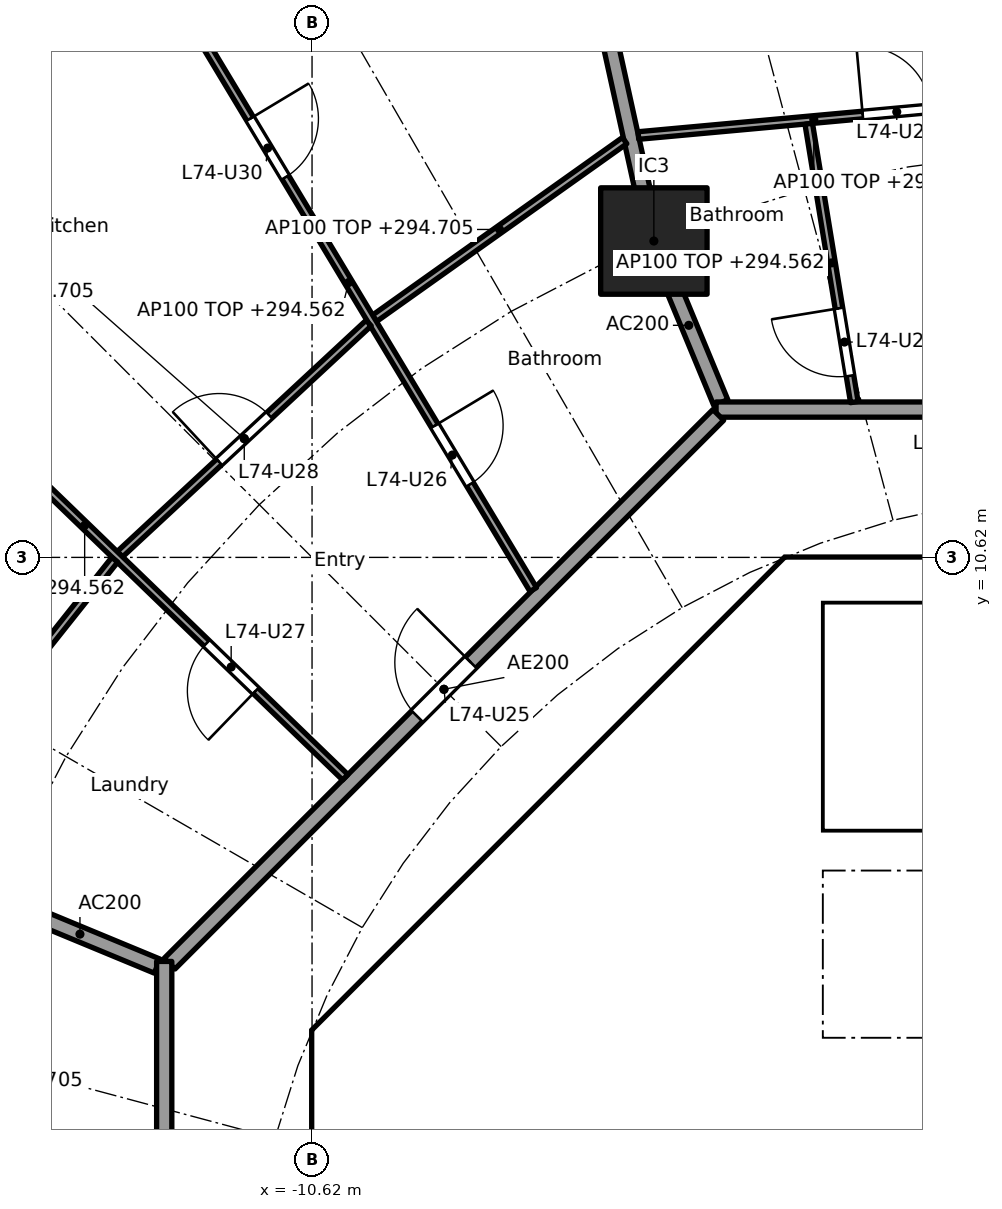
"""IFC4 building model, lengths in metres.
Left out: names, types, materials, properties, quantities, classifications, styles, units other than length and angle.
Written with IfcOpenShell. Run it as: python <this file> out.ifc"""

import sys

from ifc_helpers import new_model, si_unit, direction, frame, frame_2d, origin, origin_2d, place, context, subcontext, project, spatial, polyline, rectangle, outline, extrude, element, fill, save


model = new_model("IFC4")
c1 = context("Model", 3, precision=1e-05, world=origin(), true_north=direction((0.0, 1.0)))
c2 = subcontext(c1, "Body", "Model", "MODEL_VIEW")
j1 = project(units=[si_unit("LENGTHUNIT", "METRE"), si_unit("PLANEANGLEUNIT", "RADIAN")], contexts=[c1])
p1 = place(None, origin())
s1 = spatial("IfcSite", under=j1, at=p1, CompositionType="ELEMENT")
p2 = place(p1, origin())
s2 = spatial("IfcBuilding", under=s1, at=p2, CompositionType="ELEMENT")
p3 = place(p2, frame((0.0, 0.0, 291.8)))
s3 = spatial("IfcBuildingStorey", under=s2, at=p3, CompositionType="ELEMENT", Elevation=291.8)
p4 = place(p3, frame((-6.123, 14.782, 0.0), z_axis=(0.0, 0.0, 1.0), x_axis=(1.0, 0.0, 0.0)))
e1 = element("IfcColumn", 1, at=p4, inside=s3, PredefinedType="COLUMN", context=c2, shape_type="SweptSolid", body=[
    extrude(rectangle(XDim=1.4, YDim=1.4, at=origin_2d()), origin(), (0.0, 0.0, 1.0), 3.7),
])
p5 = place(p3, frame((-4.613, 9.988, 0.0), z_axis=(0.0, 0.0, 1.0), x_axis=(-0.707106781187, -0.707106781187, 0.0)))
e2 = element("IfcWall", 2, at=p5, inside=s3, PredefinedType="SHEAR", context=c2, shape_type="SweptSolid", body=[
    extrude(rectangle(XDim=7.602, YDim=0.6, at=frame_2d((3.801, 0.0))), origin(), (0.0, 0.0, 1.0), 3.44),
])
p6 = place(p5, frame((0.351, 0.0, 0.0)))
e3 = element("IfcOpeningElement", 3, at=p6, cuts=e2, PredefinedType="OPENING", context=c2, shape_type="SweptSolid", body=[
    extrude(rectangle(XDim=1.1, YDim=2.1, at=frame_2d((0.55, 1.05))), frame((0.0, 0.31, 0.0), z_axis=(0.0, -1.0, 0.0), x_axis=(1.0, 0.0, 0.0)), (0.0, 0.0, 1.0), 0.62),
])
p7 = place(p3, frame((-10.325, 3.801, 0.0), z_axis=(0.0, 0.0, 1.0), x_axis=(0.0, -1.0, 0.0)))
e4 = element("IfcWall", 4, at=p7, inside=s3, PredefinedType="SHEAR", context=c2, shape_type="SweptSolid", body=[
    extrude(rectangle(XDim=7.602, YDim=0.6, at=frame_2d((3.801, 0.0))), origin(), (0.0, 0.0, 1.0), 3.44),
])
p8 = place(p7, frame((0.651, 0.0, 0.0)))
e5 = element("IfcOpeningElement", 5, at=p8, cuts=e4, PredefinedType="OPENING", context=c2, shape_type="SweptSolid", body=[
    extrude(rectangle(XDim=1.5, YDim=2.1, at=frame_2d((0.75, 1.05))), frame((0.0, 0.31, 0.0), z_axis=(0.0, -1.0, 0.0), x_axis=(1.0, 0.0, 0.0)), (0.0, 0.0, 1.0), 0.62),
])
p9 = place(p7, frame((5.451, 0.0, 0.0)))
e6 = element("IfcOpeningElement", 6, at=p9, cuts=e4, PredefinedType="OPENING", context=c2, shape_type="SweptSolid", body=[
    extrude(rectangle(XDim=1.5, YDim=2.1, at=frame_2d((0.75, 1.05))), frame((0.0, 0.31, 0.0), z_axis=(0.0, -1.0, 0.0), x_axis=(1.0, 0.0, 0.0)), (0.0, 0.0, 1.0), 0.62),
])
p10 = place(p3, frame((-5.8, 4.3, 0.0), z_axis=(0.0, 0.0, 1.0), x_axis=(0.0, 1.0, 0.0)))
e7 = element("IfcWall", 7, at=p10, inside=s3, PredefinedType="PARTITIONING", context=c2, shape_type="SweptSolid", body=[
    extrude(rectangle(XDim=3.927, YDim=0.15, at=frame_2d((1.963, 0.0))), origin(), (0.0, 0.0, 1.0), 3.44),
])
p11 = place(p10, frame((1.551, 0.0, 0.0)))
e8 = element("IfcOpeningElement", 8, at=p11, cuts=e7, PredefinedType="OPENING", context=c2, shape_type="SweptSolid", body=[
    extrude(rectangle(XDim=0.9, YDim=2.1, at=frame_2d((0.45, 1.05))), frame((0.0, 0.085, 0.0), z_axis=(0.0, -1.0, 0.0), x_axis=(1.0, 0.0, 0.0)), (0.0, 0.0, 1.0), 0.17),
])
p12 = place(p3, frame((-4.0, 4.3, 0.0), z_axis=(0.0, 0.0, 1.0), x_axis=(0.0, 1.0, 0.0)))
e9 = element("IfcWall", 9, at=p12, inside=s3, PredefinedType="SOLIDWALL", context=c2, shape_type="SweptSolid", body=[
    extrude(rectangle(XDim=2.2, YDim=0.2, at=frame_2d((1.1, 0.0))), origin(), (0.0, 0.0, 1.0), 3.44),
])
p13 = place(p12, frame((0.55, 0.0, 0.0)))
e10 = element("IfcOpeningElement", 10, at=p13, cuts=e9, PredefinedType="OPENING", context=c2, shape_type="SweptSolid", body=[
    extrude(rectangle(XDim=1.1, YDim=2.1, at=frame_2d((0.55, 1.05))), frame((0.0, 0.11, 0.0), z_axis=(0.0, -1.0, 0.0), x_axis=(1.0, 0.0, 0.0)), (0.0, 0.0, 1.0), 0.22),
])
p14 = place(p3, origin())
e11 = element("IfcWall", 11, at=p14, inside=s3, PredefinedType="SHEAR", context=c2, shape_type="SweptSolid", body=[
    extrude(outline(polyline([(-10.2, 4.825), (-9.776, 4.401), (-10.025, 4.152), (-10.025, 3.801), (-10.625, 3.801), (-10.625, 4.401), (-10.2, 4.825)])), origin(), (0.0, 0.0, 1.0), 3.44),
])
p15 = place(p3, origin())
e12 = element("IfcWall", 12, at=p15, inside=s3, PredefinedType="SHEAR", context=c2, shape_type="SweptSolid", body=[
    extrude(outline(polyline([(-4.152, 10.025), (-4.401, 9.776), (-4.825, 10.2), (-4.401, 10.625), (4.401, 10.625), (4.825, 10.2), (4.401, 9.776), (4.152, 10.025), (-4.152, 10.025)])), origin(), (0.0, 0.0, 1.0), 3.44),
])
p16 = place(p3, origin())
e13 = element("IfcWall", 13, at=p16, inside=s3, PredefinedType="SOLIDWALL", context=c2, shape_type="SweptSolid", body=[
    extrude(outline(polyline([(-6.7, 4.3), (6.7, 4.3), (6.7, 2.1), (6.5, 2.1), (6.5, 4.1), (4.5, 4.1), (4.5, 2.1), (4.3, 2.1), (4.3, 4.1), (0.1, 4.1), (0.1, 2.1), (-0.1, 2.1), (-0.1, 4.1), (-6.5, 4.1), (-6.5, 2.1), (-6.7, 2.1), (-6.7, 4.3)])), origin(), (0.0, 0.0, 1.0), 3.44),
])
p17 = place(p3, frame((-10.025, 4.0, 0.0), z_axis=(0.0, 0.0, 1.0), x_axis=(1.0, 0.0, 0.0)))
e14 = element("IfcWall", 14, at=p17, inside=s3, PredefinedType="PARTITIONING", context=c2, shape_type="SweptSolid", body=[
    extrude(rectangle(XDim=3.325, YDim=0.2, at=frame_2d((1.662, 0.0))), origin(), (0.0, 0.0, 1.0), 3.44),
])
p18 = place(p3, origin())
e15 = element("IfcWall", 15, at=p18, inside=s3, PredefinedType="SOLIDWALL", context=c2, shape_type="SweptSolid", body=[
    extrude(outline(polyline([(-3.9, 7.025), (-4.1, 7.025), (-4.1, 10.025), (-3.9, 10.025), (-3.9, 7.025)])), origin(), (0.0, 0.0, 1.0), 3.44),
])
p19 = place(p3, origin())
e16 = element("IfcWall", 16, at=p19, inside=s3, PredefinedType="SOLIDWALL", context=c2, shape_type="SweptSolid", body=[
    extrude(outline(polyline([(4.1, 6.5), (-4.1, 6.5), (-4.1, 7.025), (4.1, 7.025), (4.1, 6.5)])), origin(), (0.0, 0.0, 1.0), 3.44),
])
p20 = place(p3, frame((-5.243, 12.657, 0.0), z_axis=(0.0, 0.0, 1.0), x_axis=(-0.38273085373, 0.923859888513, 0.0)))
e17 = element("IfcWall", 17, at=p20, inside=s3, PredefinedType="PARTITIONING", context=c2, shape_type="SweptSolid", body=[
    extrude(rectangle(XDim=2.199, YDim=0.2, at=frame_2d((1.1, 0.0))), origin(), (0.0, 0.0, 1.0), 3.44),
])
p21 = place(p3, frame((-6.134, 14.831, 0.0), z_axis=(0.0, 0.0, 1.0), x_axis=(-0.214842475666, 0.976648714047, 0.0)))
e18 = element("IfcWall", 18, at=p21, inside=s3, PredefinedType="PARTITIONING", context=c2, shape_type="SweptSolid", body=[
    extrude(rectangle(XDim=6.031, YDim=0.2, at=frame_2d((3.015, 0.0))), origin(), (0.0, 0.0, 1.0), 2.905),
])
p22 = place(p3, frame((-12.657, 5.243, 0.0), z_axis=(0.0, 0.0, 1.0), x_axis=(-0.923869415315, 0.382707856524, 0.0)))
e19 = element("IfcWall", 19, at=p22, inside=s3, PredefinedType="PARTITIONING", context=c2, shape_type="SweptSolid", body=[
    extrude(rectangle(XDim=2.2, YDim=0.2, at=frame_2d((1.1, 0.0))), origin(), (0.0, 0.0, 1.0), 3.44),
])
p23 = place(p3, frame((5.104, 12.565, 0.0), z_axis=(0.0, 0.0, 1.0), x_axis=(-1.0, 0.0, 0.0)))
e20 = element("IfcWall", 20, at=p23, inside=s3, PredefinedType="PARTITIONING", context=c2, shape_type="SweptSolid", body=[
    extrude(rectangle(XDim=10.409, YDim=0.2, at=frame_2d((5.205, 0.0))), origin(), (0.0, 0.0, 1.0), 3.44),
])
p24 = place(p23, frame((6.339, 0.0, 0.0)))
e21 = element("IfcOpeningElement", 21, at=p24, cuts=e20, PredefinedType="OPENING", context=c2, shape_type="SweptSolid", body=[
    extrude(rectangle(XDim=1.0, YDim=2.1, at=frame_2d((0.5, 1.05))), frame((0.0, 0.11, 0.0), z_axis=(0.0, -1.0, 0.0), x_axis=(1.0, 0.0, 0.0)), (0.0, 0.0, 1.0), 0.22),
])
p25 = place(p3, frame((-5.275, 12.494, 0.0), z_axis=(0.0, 0.0, 1.0), x_axis=(-0.707106781187, -0.707106781187, 0.0)))
e22 = element("IfcWall", 22, at=p25, inside=s3, PredefinedType="PARTITIONING", context=c2, shape_type="SweptSolid", body=[
    extrude(rectangle(XDim=10.209, YDim=0.2, at=frame_2d((5.104, 0.0))), origin(), (0.0, 0.0, 1.0), 3.44),
])
p26 = place(p25, frame((4.604, 0.0, 0.0)))
e23 = element("IfcOpeningElement", 23, at=p26, cuts=e22, PredefinedType="OPENING", context=c2, shape_type="SweptSolid", body=[
    extrude(rectangle(XDim=1.0, YDim=2.1, at=frame_2d((0.5, 1.05))), frame((0.0, 0.11, 0.0), z_axis=(0.0, -1.0, 0.0), x_axis=(1.0, 0.0, 0.0)), (0.0, 0.0, 1.0), 0.22),
])
p27 = place(p3, frame((-12.565, 5.304, 0.0), z_axis=(0.0, 0.0, 1.0), x_axis=(0.0, -1.0, 0.0)))
e24 = element("IfcWall", 24, at=p27, inside=s3, PredefinedType="PARTITIONING", context=c2, shape_type="SweptSolid", body=[
    extrude(rectangle(XDim=10.409, YDim=0.2, at=frame_2d((5.205, 0.0))), origin(), (0.0, 0.0, 1.0), 3.44),
])
p28 = place(p27, frame((4.804, 0.0, 0.0)))
e25 = element("IfcOpeningElement", 25, at=p28, cuts=e24, PredefinedType="OPENING", context=c2, shape_type="SweptSolid", body=[
    extrude(rectangle(XDim=1.0, YDim=2.1, at=frame_2d((0.5, 1.05))), frame((0.0, 0.11, 0.0), z_axis=(0.0, -1.0, 0.0), x_axis=(1.0, 0.0, 0.0)), (0.0, 0.0, 1.0), 0.22),
])
p29 = place(p3, frame((-1.711, 16.592, 0.0), z_axis=(0.0, 0.0, 1.0), x_axis=(-0.995843837247, -0.091077175065, 0.0)))
e26 = element("IfcWall", 26, at=p29, inside=s3, PredefinedType="PARTITIONING", context=c2, shape_type="SweptSolid", body=[
    extrude(rectangle(XDim=4.635, YDim=0.1, at=frame_2d((2.317, 0.0))), origin(), (0.0, 0.0, 1.0), 2.905),
])
p30 = place(p29, frame((0.771, 0.0, 0.0)))
e27 = element("IfcOpeningElement", 27, at=p30, cuts=e26, PredefinedType="OPENING", context=c2, shape_type="SweptSolid", body=[
    extrude(rectangle(XDim=0.9, YDim=2.1, at=frame_2d((0.45, 1.05))), frame((0.0, 0.06, 0.0), z_axis=(0.0, -1.0, 0.0), x_axis=(1.0, 0.0, 0.0)), (0.0, 0.0, 1.0), 0.12),
])
p31 = place(p3, frame((-3.486, 12.663, 0.0), z_axis=(0.0, 0.0, 1.0), x_axis=(-0.161602751674, 0.986855891532, 0.0)))
e28 = element("IfcWall", 28, at=p31, inside=s3, PredefinedType="PARTITIONING", context=c2, shape_type="SweptSolid", body=[
    extrude(rectangle(XDim=3.71, YDim=0.1, at=frame_2d((1.855, 0.0))), origin(), (0.0, 0.0, 1.0), 2.762),
])
p32 = place(p31, frame((0.35, 0.0, 0.0)))
e29 = element("IfcOpeningElement", 29, at=p32, cuts=e28, PredefinedType="OPENING", context=c2, shape_type="SweptSolid", body=[
    extrude(rectangle(XDim=0.9, YDim=2.1, at=frame_2d((0.45, 1.05))), frame((0.0, 0.06, 0.0), z_axis=(0.0, -1.0, 0.0), x_axis=(1.0, 0.0, 0.0)), (0.0, 0.0, 1.0), 0.12),
])
p33 = place(p3, frame((-6.508, 16.103, 0.0), z_axis=(0.0, 0.0, 1.0), x_axis=(-0.815202203556, -0.579176456114, 0.0)))
e30 = element("IfcWall", 30, at=p33, inside=s3, PredefinedType="PARTITIONING", context=c2, shape_type="SweptSolid", body=[
    extrude(rectangle(XDim=4.036, YDim=0.1, at=frame_2d((2.018, 0.0))), origin(), (0.0, 0.0, 1.0), 2.905),
])
p34 = place(p3, frame((-7.709, 10.197, 0.0), z_axis=(0.0, 0.0, 1.0), x_axis=(-0.515516160663, 0.856879856278, 0.0)))
e31 = element("IfcWall", 31, at=p34, inside=s3, PredefinedType="PARTITIONING", context=c2, shape_type="SweptSolid", body=[
    extrude(rectangle(XDim=9.426, YDim=0.1, at=frame_2d((4.713, 0.0))), origin(), (0.0, 0.0, 1.0), 2.762),
])
p35 = place(p34, frame((1.615, 0.0, 0.0)))
e32 = element("IfcOpeningElement", 32, at=p35, cuts=e31, PredefinedType="OPENING", context=c2, shape_type="SweptSolid", body=[
    extrude(rectangle(XDim=0.9, YDim=2.1, at=frame_2d((0.45, 1.05))), frame((0.0, 0.06, 0.0), z_axis=(0.0, -1.0, 0.0), x_axis=(1.0, 0.0, 0.0)), (0.0, 0.0, 1.0), 0.12),
])
p36 = place(p34, frame((6.328, 0.0, 0.0)))
e33 = element("IfcOpeningElement", 33, at=p36, cuts=e31, PredefinedType="OPENING", context=c2, shape_type="SweptSolid", body=[
    extrude(rectangle(XDim=0.9, YDim=2.1, at=frame_2d((0.45, 1.05))), frame((0.0, 0.06, 0.0), z_axis=(0.0, -1.0, 0.0), x_axis=(1.0, 0.0, 0.0)), (0.0, 0.0, 1.0), 0.12),
])
p37 = place(p3, frame((-9.875, 13.702, 0.0), z_axis=(0.0, 0.0, 1.0), x_axis=(-0.732618266441, -0.680639754699, 0.0)))
e34 = element("IfcWall", 34, at=p37, inside=s3, PredefinedType="PARTITIONING", context=c2, shape_type="SweptSolid", body=[
    extrude(rectangle(XDim=4.467, YDim=0.1, at=frame_2d((2.233, 0.0))), origin(), (0.0, 0.0, 1.0), 2.905),
])
p38 = place(p37, frame((1.783, 0.0, 0.0)))
e35 = element("IfcOpeningElement", 35, at=p38, cuts=e34, PredefinedType="OPENING", context=c2, shape_type="SweptSolid", body=[
    extrude(rectangle(XDim=0.9, YDim=2.1, at=frame_2d((0.45, 1.05))), frame((0.0, 0.06, 0.0), z_axis=(0.0, -1.0, 0.0), x_axis=(1.0, 0.0, 0.0)), (0.0, 0.0, 1.0), 0.12),
])
p39 = place(p3, frame((-10.183, 7.727, 0.0), z_axis=(0.0, 0.0, 1.0), x_axis=(-0.719063433856, 0.694944442449, 0.0)))
e36 = element("IfcWall", 36, at=p39, inside=s3, PredefinedType="PARTITIONING", context=c2, shape_type="SweptSolid", body=[
    extrude(rectangle(XDim=9.535, YDim=0.1, at=frame_2d((4.768, 0.0))), origin(), (0.0, 0.0, 1.0), 2.762),
])
p40 = place(p39, frame((1.637, 0.0, 0.0)))
e37 = element("IfcOpeningElement", 37, at=p40, cuts=e36, PredefinedType="OPENING", context=c2, shape_type="SweptSolid", body=[
    extrude(rectangle(XDim=0.9, YDim=2.1, at=frame_2d((0.45, 1.05))), frame((0.0, 0.06, 0.0), z_axis=(0.0, -1.0, 0.0), x_axis=(1.0, 0.0, 0.0)), (0.0, 0.0, 1.0), 0.12),
])
p41 = place(p39, frame((6.405, 0.0, 0.0)))
e38 = element("IfcOpeningElement", 38, at=p41, cuts=e36, PredefinedType="OPENING", context=c2, shape_type="SweptSolid", body=[
    extrude(rectangle(XDim=0.9, YDim=2.1, at=frame_2d((0.45, 1.05))), frame((0.0, 0.06, 0.0), z_axis=(0.0, -1.0, 0.0), x_axis=(1.0, 0.0, 0.0)), (0.0, 0.0, 1.0), 0.12),
])
p42 = place(p3, frame((-13.216, 10.589, 0.0), z_axis=(0.0, 0.0, 1.0), x_axis=(-0.622251572882, -0.782817335045, 0.0)))
e39 = element("IfcWall", 39, at=p42, inside=s3, PredefinedType="PARTITIONING", context=c2, shape_type="SweptSolid", body=[
    extrude(rectangle(XDim=4.636, YDim=0.1, at=frame_2d((2.318, 0.0))), origin(), (0.0, 0.0, 1.0), 2.905),
])
p43 = place(p3, frame((-12.664, 1.751, 0.0), z_axis=(0.0, 0.0, 1.0), x_axis=(-0.986935394566, 0.161116501183, 0.0)))
e40 = element("IfcWall", 40, at=p43, inside=s3, PredefinedType="PARTITIONING", context=c2, shape_type="SweptSolid", body=[
    extrude(rectangle(XDim=10.086, YDim=0.1, at=frame_2d((5.043, 0.0))), origin(), (0.0, 0.0, 1.0), 2.762),
])
p44 = place(p43, frame((1.746, 0.0, 0.0)))
e41 = element("IfcOpeningElement", 41, at=p44, cuts=e40, PredefinedType="OPENING", context=c2, shape_type="SweptSolid", body=[
    extrude(rectangle(XDim=0.9, YDim=2.1, at=frame_2d((0.45, 1.05))), frame((0.0, 0.06, 0.0), z_axis=(0.0, -1.0, 0.0), x_axis=(1.0, 0.0, 0.0)), (0.0, 0.0, 1.0), 0.12),
])
p45 = place(p13, origin())
e42 = element("IfcDoor", 42, at=p45, inside=s3, OperationType="DOUBLE_DOOR_SLIDING", PredefinedType="DOOR", context=c2, shape_type="SweptSolid", body=[
    extrude(rectangle(XDim=1.1, YDim=2.1, at=frame_2d((0.55, 1.05))), frame((0.0, 0.025, 0.0), z_axis=(0.0, -1.0, 0.0), x_axis=(1.0, 0.0, 0.0)), (0.0, 0.0, 1.0), 0.05),
])
fill(e10, e42)
p46 = place(p11, origin())
e43 = element("IfcDoor", 43, at=p46, inside=s3, OperationType="SINGLE_SWING_RIGHT", PredefinedType="DOOR", context=c2, shape_type="SweptSolid", body=[
    extrude(rectangle(XDim=0.9, YDim=2.1, at=frame_2d((0.45, 1.05))), frame((0.0, 0.025, 0.0), z_axis=(0.0, -1.0, 0.0), x_axis=(1.0, 0.0, 0.0)), (0.0, 0.0, 1.0), 0.05),
])
fill(e8, e43)
p47 = place(p8, origin())
e44 = element("IfcDoor", 44, at=p47, inside=s3, OperationType="DOUBLE_DOOR_SINGLE_SWING", PredefinedType="DOOR", context=c2, shape_type="SweptSolid", body=[
    extrude(rectangle(XDim=1.5, YDim=2.1, at=frame_2d((0.75, 1.05))), frame((0.0, 0.025, 0.0), z_axis=(0.0, -1.0, 0.0), x_axis=(1.0, 0.0, 0.0)), (0.0, 0.0, 1.0), 0.05),
])
fill(e5, e44)
p48 = place(p6, origin())
e45 = element("IfcDoor", 45, at=p48, inside=s3, OperationType="SINGLE_SWING_RIGHT", PredefinedType="DOOR", context=c2, shape_type="SweptSolid", body=[
    extrude(rectangle(XDim=1.1, YDim=2.1, at=frame_2d((0.55, 1.05))), frame((0.0, 0.025, 0.0), z_axis=(0.0, -1.0, 0.0), x_axis=(1.0, 0.0, 0.0)), (0.0, 0.0, 1.0), 0.05),
])
fill(e3, e45)
p49 = place(p32, origin())
e46 = element("IfcDoor", 46, at=p49, inside=s3, OperationType="SINGLE_SWING_RIGHT", PredefinedType="DOOR", context=c2, shape_type="SweptSolid", body=[
    extrude(rectangle(XDim=0.9, YDim=2.1, at=frame_2d((0.45, 1.05))), frame((0.0, 0.025, 0.0), z_axis=(0.0, -1.0, 0.0), x_axis=(1.0, 0.0, 0.0)), (0.0, 0.0, 1.0), 0.05),
])
fill(e29, e46)
p50 = place(p30, frame((0.9, 0.0, 0.0), x_axis=(-1.0, 0.0, 0.0)))
e47 = element("IfcDoor", 47, at=p50, inside=s3, OperationType="SINGLE_SWING_LEFT", PredefinedType="DOOR", context=c2, shape_type="SweptSolid", body=[
    extrude(rectangle(XDim=0.9, YDim=2.1, at=frame_2d((0.45, 1.05))), frame((0.0, 0.025, 0.0), z_axis=(0.0, -1.0, 0.0), x_axis=(1.0, 0.0, 0.0)), (0.0, 0.0, 1.0), 0.05),
])
fill(e27, e47)
p51 = place(p26, frame((1.0, 0.0, 0.0), x_axis=(-1.0, 0.0, 0.0)))
e48 = element("IfcDoor", 48, at=p51, inside=s3, OperationType="SINGLE_SWING_RIGHT", PredefinedType="DOOR", context=c2, shape_type="SweptSolid", body=[
    extrude(rectangle(XDim=1.0, YDim=2.1, at=frame_2d((0.5, 1.05))), frame((0.0, 0.025, 0.0), z_axis=(0.0, -1.0, 0.0), x_axis=(1.0, 0.0, 0.0)), (0.0, 0.0, 1.0), 0.05),
])
fill(e23, e48)
p52 = place(p35, frame((0.9, 0.0, 0.0), x_axis=(-1.0, 0.0, 0.0)))
e49 = element("IfcDoor", 49, at=p52, inside=s3, OperationType="SINGLE_SWING_LEFT", PredefinedType="DOOR", context=c2, shape_type="SweptSolid", body=[
    extrude(rectangle(XDim=0.9, YDim=2.1, at=frame_2d((0.45, 1.05))), frame((0.0, 0.025, 0.0), z_axis=(0.0, -1.0, 0.0), x_axis=(1.0, 0.0, 0.0)), (0.0, 0.0, 1.0), 0.05),
])
fill(e32, e49)
p53 = place(p40, origin())
e50 = element("IfcDoor", 50, at=p53, inside=s3, OperationType="SINGLE_SWING_LEFT", PredefinedType="DOOR", context=c2, shape_type="SweptSolid", body=[
    extrude(rectangle(XDim=0.9, YDim=2.1, at=frame_2d((0.45, 1.05))), frame((0.0, 0.025, 0.0), z_axis=(0.0, -1.0, 0.0), x_axis=(1.0, 0.0, 0.0)), (0.0, 0.0, 1.0), 0.05),
])
fill(e37, e50)
p54 = place(p38, frame((0.9, 0.0, 0.0), x_axis=(-1.0, 0.0, 0.0)))
e51 = element("IfcDoor", 51, at=p54, inside=s3, OperationType="SINGLE_SWING_LEFT", PredefinedType="DOOR", context=c2, shape_type="SweptSolid", body=[
    extrude(rectangle(XDim=0.9, YDim=2.1, at=frame_2d((0.45, 1.05))), frame((0.0, 0.025, 0.0), z_axis=(0.0, -1.0, 0.0), x_axis=(1.0, 0.0, 0.0)), (0.0, 0.0, 1.0), 0.05),
])
fill(e35, e51)
p55 = place(p36, frame((0.9, 0.0, 0.0), x_axis=(-1.0, 0.0, 0.0)))
e52 = element("IfcDoor", 52, at=p55, inside=s3, OperationType="SINGLE_SWING_LEFT", PredefinedType="DOOR", context=c2, shape_type="SweptSolid", body=[
    extrude(rectangle(XDim=0.9, YDim=2.1, at=frame_2d((0.45, 1.05))), frame((0.0, 0.025, 0.0), z_axis=(0.0, -1.0, 0.0), x_axis=(1.0, 0.0, 0.0)), (0.0, 0.0, 1.0), 0.05),
])
fill(e33, e52)
save(model, sys.argv[1])
